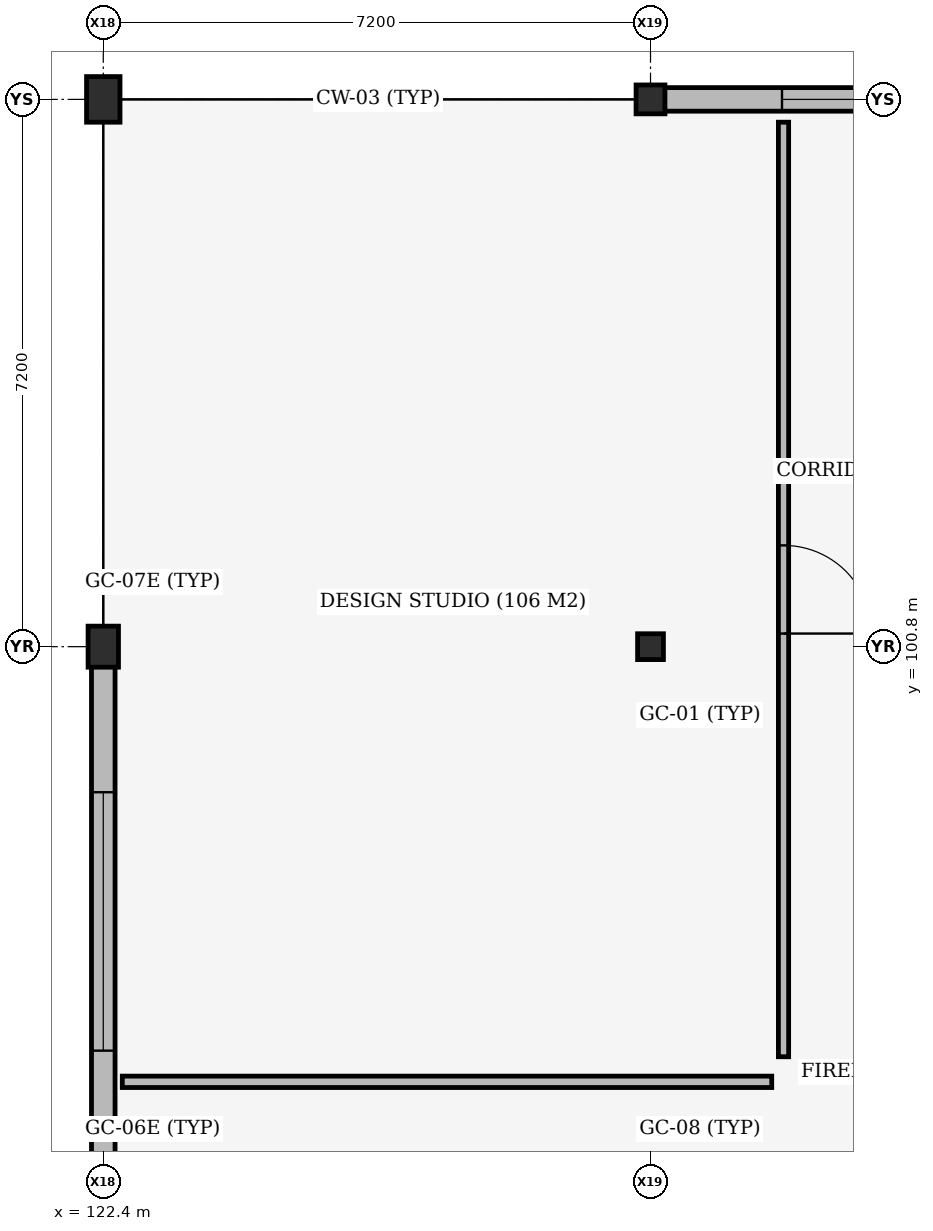
"""IFC4 building model, lengths in metres.
Left out: names, types, materials, properties, quantities, classifications, styles, units other than length and angle.
Written with IfcOpenShell. Run it as: python <this file> out.ifc"""

import sys

from ifc_helpers import new_model, si_unit, direction, frame, frame_2d, origin, origin_2d, place, context, subcontext, project, spatial, rectangle, extrude, element, fill, save


model = new_model("IFC4")
c1 = context("Model", 3, precision=1e-05, world=origin(), true_north=direction((0.0, 1.0)))
c2 = subcontext(c1, "Body", "Model", "MODEL_VIEW")
j1 = project(units=[si_unit("LENGTHUNIT", "METRE"), si_unit("PLANEANGLEUNIT", "RADIAN")], contexts=[c1])
p1 = place(None, origin())
s1 = spatial("IfcSite", under=j1, at=p1, CompositionType="ELEMENT")
p2 = place(p1, origin())
s2 = spatial("IfcBuilding", under=s1, at=p2, CompositionType="ELEMENT")
p3 = place(p2, frame((0.0, 0.0, 9.6)))
s3 = spatial("IfcBuildingStorey", under=s2, at=p3, CompositionType="ELEMENT", Elevation=9.6)
p4 = place(p3, frame((122.4, 100.8, 0.0), z_axis=(0.0, 0.0, 1.0), x_axis=(1.0, 0.0, 0.0)))
e1 = element("IfcColumn", 1, at=p4, inside=s3, PredefinedType="COLUMN", context=c2, shape_type="SweptSolid", body=[
    extrude(rectangle(XDim=0.4, YDim=0.54, at=origin_2d()), origin(), (0.0, 0.0, 1.0), 3.92),
])
p5 = place(p3, frame((122.4, 108.0, 0.0), z_axis=(0.0, 0.0, 1.0), x_axis=(1.0, 0.0, 0.0)))
e2 = element("IfcColumn", 2, at=p5, inside=s3, PredefinedType="COLUMN", context=c2, shape_type="SweptSolid", body=[
    extrude(rectangle(XDim=0.44, YDim=0.6, at=origin_2d()), origin(), (0.0, 0.0, 1.0), 3.96),
])
p6 = place(p3, frame((129.6, 100.8, 0.0), z_axis=(0.0, 0.0, 1.0), x_axis=(1.0, 0.0, 0.0)))
e3 = element("IfcColumn", 3, at=p6, inside=s3, PredefinedType="COLUMN", context=c2, shape_type="SweptSolid", body=[
    extrude(rectangle(XDim=0.34, YDim=0.34, at=origin_2d()), origin(), (0.0, 0.0, 1.0), 3.92),
])
p7 = place(p3, frame((129.6, 108.0, 0.0), z_axis=(0.0, 0.0, 1.0), x_axis=(1.0, 0.0, 0.0)))
e4 = element("IfcColumn", 4, at=p7, inside=s3, PredefinedType="COLUMN", context=c2, shape_type="SweptSolid", body=[
    extrude(rectangle(XDim=0.38, YDim=0.38, at=origin_2d()), origin(), (0.0, 0.0, 1.0), 3.96),
])
p8 = place(p3, frame((129.782, 108.0, 0.0), z_axis=(0.0, 0.0, 1.0), x_axis=(1.0, 0.0, 0.0)))
e5 = element("IfcWall", 5, at=p8, inside=s3, PredefinedType="STANDARD", context=c2, shape_type="SweptSolid", body=[
    extrude(rectangle(XDim=6.796, YDim=0.31, at=frame_2d((3.398, 0.0))), origin(), (0.0, 0.0, 1.0), 3.92),
])
p9 = place(p8, frame((1.548, 0.0, 0.9)))
e6 = element("IfcOpeningElement", 6, at=p9, cuts=e5, PredefinedType="OPENING", context=c2, shape_type="SweptSolid", body=[
    extrude(rectangle(XDim=1.45, YDim=2.35, at=frame_2d((0.725, 1.175))), frame((0.0, 0.165, 0.0), z_axis=(0.0, -1.0, 0.0), x_axis=(1.0, 0.0, 0.0)), (0.0, 0.0, 1.0), 0.33),
])
p10 = place(p8, frame((3.798, 0.0, 0.9)))
e7 = element("IfcOpeningElement", 7, at=p10, cuts=e5, PredefinedType="OPENING", context=c2, shape_type="SweptSolid", body=[
    extrude(rectangle(XDim=1.45, YDim=2.35, at=frame_2d((0.725, 1.175))), frame((0.0, 0.165, 0.0), z_axis=(0.0, -1.0, 0.0), x_axis=(1.0, 0.0, 0.0)), (0.0, 0.0, 1.0), 0.33),
])
p11 = place(p3, frame((122.4, 93.832, 0.0), z_axis=(0.0, 0.0, 1.0), x_axis=(0.0, 1.0, 0.0)))
e8 = element("IfcWall", 8, at=p11, inside=s3, PredefinedType="STANDARD", context=c2, shape_type="SweptSolid", body=[
    extrude(rectangle(XDim=6.706, YDim=0.31, at=frame_2d((3.353, 0.0))), origin(), (0.0, 0.0, 1.0), 3.28),
])
p12 = place(p11, frame((1.653, 0.0, 0.9)))
e9 = element("IfcOpeningElement", 9, at=p12, cuts=e8, PredefinedType="OPENING", context=c2, shape_type="SweptSolid", body=[
    extrude(rectangle(XDim=3.4, YDim=1.5, at=frame_2d((1.7, 0.75))), frame((0.0, 0.165, 0.0), z_axis=(0.0, -1.0, 0.0), x_axis=(1.0, 0.0, 0.0)), (0.0, 0.0, 1.0), 0.33),
])
p13 = place(p3, frame((172.68, 107.88, 4.2), z_axis=(0.0, 0.0, 1.0), x_axis=(-1.0, 0.0, 0.0)))
e10 = element("IfcWall", 10, at=p13, inside=s3, PredefinedType="PARAPET", context=c2, shape_type="SweptSolid", body=[
    extrude(rectangle(XDim=50.16, YDim=0.215, at=frame_2d((25.08, 0.0))), origin(), (0.0, 0.0, 1.0), 0.85),
])
p14 = place(p3, frame((122.52, 107.88, 4.2), z_axis=(0.0, 0.0, 1.0), x_axis=(0.0, -1.0, 0.0)))
e11 = element("IfcWall", 11, at=p14, inside=s3, PredefinedType="PARAPET", context=c2, shape_type="SweptSolid", body=[
    extrude(rectangle(XDim=6.53, YDim=0.215, at=frame_2d((3.265, 0.0))), origin(), (0.0, 0.0, 1.0), 0.85),
])
p15 = place(p3, frame((122.65, 95.075, 0.0), z_axis=(0.0, 0.0, 1.0), x_axis=(1.0, 0.0, 0.0)))
e12 = element("IfcWall", 12, at=p15, inside=s3, PredefinedType="PARTITIONING", context=c2, shape_type="SweptSolid", body=[
    extrude(rectangle(XDim=8.545, YDim=0.15, at=frame_2d((4.272, 0.0))), origin(), (0.0, 0.0, 1.0), 3.18),
])
p16 = place(p3, frame((131.35, 95.405, 0.0), z_axis=(0.0, 0.0, 1.0), x_axis=(0.0, 1.0, 0.0)))
e13 = element("IfcWall", 13, at=p16, inside=s3, PredefinedType="PARTITIONING", context=c2, shape_type="SweptSolid", body=[
    extrude(rectangle(XDim=12.295, YDim=0.135, at=frame_2d((6.147, 0.0))), origin(), (0.0, 0.0, 1.0), 3.18),
])
p17 = place(p16, frame((5.567, 0.0, 0.0)))
e14 = element("IfcOpeningElement", 14, at=p17, cuts=e13, PredefinedType="OPENING", context=c2, shape_type="SweptSolid", body=[
    extrude(rectangle(XDim=1.16, YDim=2.2, at=frame_2d((0.58, 1.1))), frame((0.0, 0.077, 0.0), z_axis=(0.0, -1.0, 0.0), x_axis=(1.0, 0.0, 0.0)), (0.0, 0.0, 1.0), 0.155),
])
p18 = place(p9, origin())
e15 = element("IfcWindow", 15, at=p18, inside=s3, PartitioningType="DOUBLE_PANEL_VERTICAL", PredefinedType="WINDOW", context=c2, shape_type="SweptSolid", body=[
    extrude(rectangle(XDim=1.45, YDim=2.35, at=frame_2d((0.725, 1.175))), frame((0.0, 0.03, 0.0), z_axis=(0.0, -1.0, 0.0), x_axis=(1.0, 0.0, 0.0)), (0.0, 0.0, 1.0), 0.06),
])
fill(e6, e15)
p19 = place(p12, origin())
e16 = element("IfcWindow", 16, at=p19, inside=s3, PartitioningType="DOUBLE_PANEL_VERTICAL", PredefinedType="WINDOW", context=c2, shape_type="SweptSolid", body=[
    extrude(rectangle(XDim=3.4, YDim=1.5, at=frame_2d((1.7, 0.75))), frame((0.0, 0.03, 0.0), z_axis=(0.0, -1.0, 0.0), x_axis=(1.0, 0.0, 0.0)), (0.0, 0.0, 1.0), 0.06),
])
fill(e9, e16)
p20 = place(p17, origin())
e17 = element("IfcDoor", 17, at=p20, inside=s3, OperationType="SINGLE_SWING_RIGHT", PredefinedType="DOOR", context=c2, shape_type="SweptSolid", body=[
    extrude(rectangle(XDim=1.16, YDim=2.2, at=frame_2d((0.58, 1.1))), frame((0.0, 0.025, 0.0), z_axis=(0.0, -1.0, 0.0), x_axis=(1.0, 0.0, 0.0)), (0.0, 0.0, 1.0), 0.05),
])
fill(e14, e17)
save(model, sys.argv[1])
